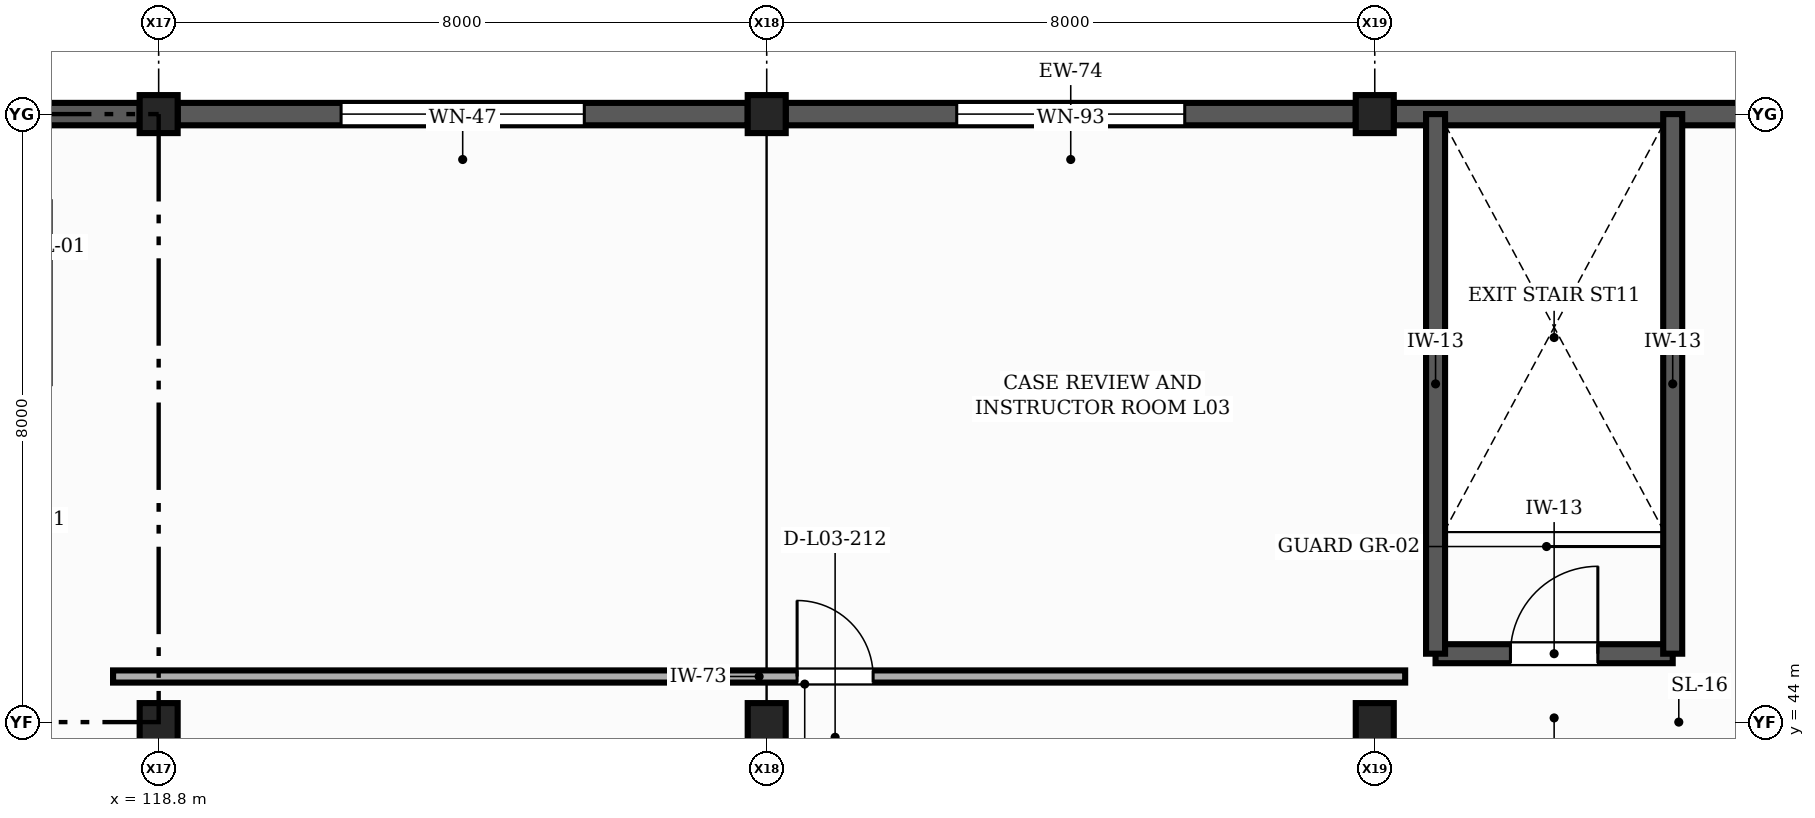
"""IFC4 building model, lengths in metres.
Left out: names, types, materials, properties, quantities, classifications, styles, units other than length and angle.
Written with IfcOpenShell. Run it as: python <this file> out.ifc"""

import sys

from ifc_helpers import new_model, si_unit, direction, frame, frame_2d, origin, origin_2d, place, context, subcontext, project, spatial, rectangle, extrude, element, fill, save


model = new_model("IFC4")
c1 = context("Model", 3, precision=1e-05, world=origin(), true_north=direction((0.0, 1.0)))
c2 = subcontext(c1, "Body", "Model", "MODEL_VIEW")
j1 = project(units=[si_unit("LENGTHUNIT", "METRE"), si_unit("PLANEANGLEUNIT", "RADIAN")], contexts=[c1])
p1 = place(None, origin())
s1 = spatial("IfcSite", under=j1, at=p1, CompositionType="ELEMENT")
p2 = place(p1, origin())
s2 = spatial("IfcBuilding", under=s1, at=p2, CompositionType="ELEMENT")
p3 = place(p2, frame((0.0, 0.0, 13.5)))
s3 = spatial("IfcBuildingStorey", under=s2, at=p3, CompositionType="ELEMENT", Elevation=13.5)
for number, where, z_axis, x_axis in (
    (1, (118.8, 44.0, 0.0), (0.0, 0.0, 1.0), (1.0, 0.0, 0.0)),
    (2, (118.8, 52.0, 0.0), (0.0, 0.0, 1.0), (1.0, 0.0, 0.0)),
    (3, (126.8, 44.0, 0.0), (0.0, 0.0, 1.0), (1.0, 0.0, 0.0)),
    (4, (126.8, 52.0, 0.0), (0.0, 0.0, 1.0), (1.0, 0.0, 0.0)),
    (5, (134.8, 44.0, 0.0), (0.0, 0.0, 1.0), (1.0, 0.0, 0.0)),
    (6, (134.8, 52.0, 0.0), (0.0, 0.0, 1.0), (1.0, 0.0, 0.0)),
):
    element("IfcColumn", number, at=place(p3, frame(where, z_axis=z_axis, x_axis=x_axis)), inside=s3, PredefinedType="COLUMN", context=c2, shape_type="SweptSolid", body=[
        extrude(rectangle(XDim=0.5, YDim=0.5, at=origin_2d()), origin(), (0.0, 0.0, 1.0), 4.5),
    ])
p4 = place(p3, frame((142.55, 52.0, 0.0), z_axis=(0.0, 0.0, 1.0), x_axis=(-1.0, 0.0, 0.0)))
e7 = element("IfcWall", 7, at=p4, inside=s3, PredefinedType="SOLIDWALL", context=c2, shape_type="SweptSolid", body=[
    extrude(rectangle(XDim=7.5, YDim=0.295, at=frame_2d((3.75, 0.0))), origin(), (0.0, 0.0, 1.0), 4.19),
])
p5 = place(p3, frame((134.55, 52.0, 0.0), z_axis=(0.0, 0.0, 1.0), x_axis=(-1.0, 0.0, 0.0)))
e8 = element("IfcWall", 8, at=p5, inside=s3, PredefinedType="SOLIDWALL", context=c2, shape_type="SweptSolid", body=[
    extrude(rectangle(XDim=7.5, YDim=0.295, at=frame_2d((3.75, 0.0))), origin(), (0.0, 0.0, 1.0), 3.54),
])
p6 = place(p5, frame((2.25, 0.0, 0.9)))
e9 = element("IfcOpeningElement", 9, at=p6, cuts=e8, PredefinedType="OPENING", context=c2, shape_type="SweptSolid", body=[
    extrude(rectangle(XDim=3.0, YDim=1.8, at=frame_2d((1.5, 0.9))), frame((0.0, 0.157, 0.0), z_axis=(0.0, -1.0, 0.0), x_axis=(1.0, 0.0, 0.0)), (0.0, 0.0, 1.0), 0.315),
])
p7 = place(p3, frame((126.55, 52.0, 0.0), z_axis=(0.0, 0.0, 1.0), x_axis=(-1.0, 0.0, 0.0)))
e10 = element("IfcWall", 10, at=p7, inside=s3, PredefinedType="SOLIDWALL", context=c2, shape_type="SweptSolid", body=[
    extrude(rectangle(XDim=7.5, YDim=0.295, at=frame_2d((3.75, 0.0))), origin(), (0.0, 0.0, 1.0), 3.54),
])
p8 = place(p7, frame((2.15, 0.0, 0.9)))
e11 = element("IfcOpeningElement", 11, at=p8, cuts=e10, PredefinedType="OPENING", context=c2, shape_type="SweptSolid", body=[
    extrude(rectangle(XDim=3.2, YDim=1.6, at=frame_2d((1.6, 0.8))), frame((0.0, 0.157, 0.0), z_axis=(0.0, -1.0, 0.0), x_axis=(1.0, 0.0, 0.0)), (0.0, 0.0, 1.0), 0.315),
])
p9 = place(p3, frame((118.55, 52.0, 0.0), z_axis=(0.0, 0.0, 1.0), x_axis=(-1.0, 0.0, 0.0)))
e12 = element("IfcWall", 12, at=p9, inside=s3, PredefinedType="SOLIDWALL", context=c2, shape_type="SweptSolid", body=[
    extrude(rectangle(XDim=7.5, YDim=0.295, at=frame_2d((3.75, 0.0))), origin(), (0.0, 0.0, 1.0), 4.19),
])
p10 = place(p3, frame((135.6, 44.9, 0.0), z_axis=(0.0, 0.0, 1.0), x_axis=(1.0, 0.0, 0.0)))
e13 = element("IfcWall", 13, at=p10, inside=s3, PredefinedType="SHEAR", context=c2, shape_type="SweptSolid", body=[
    extrude(rectangle(XDim=3.12, YDim=0.25, at=frame_2d((1.56, 0.0))), origin(), (0.0, 0.0, 1.0), 4.5),
])
p11 = place(p10, frame((0.985, 0.0, 0.0)))
e14 = element("IfcOpeningElement", 14, at=p11, cuts=e13, PredefinedType="OPENING", context=c2, shape_type="SweptSolid", body=[
    extrude(rectangle(XDim=1.15, YDim=2.15, at=frame_2d((0.575, 1.075))), frame((0.0, 0.135, 0.0), z_axis=(0.0, -1.0, 0.0), x_axis=(1.0, 0.0, 0.0)), (0.0, 0.0, 1.0), 0.27),
])
for number, where, z_axis, x_axis in (
    (15, (138.72, 44.9, 0.0), (0.0, 0.0, 1.0), (0.0, 1.0, 0.0)),
    (16, (135.6, 52.0, 0.0), (0.0, 0.0, 1.0), (0.0, -1.0, 0.0)),
):
    element("IfcWall", number, at=place(p3, frame(where, z_axis=z_axis, x_axis=x_axis)), inside=s3, PredefinedType="SHEAR", context=c2, shape_type="SweptSolid", body=[
        extrude(rectangle(XDim=7.1, YDim=0.25, at=frame_2d((3.55, 0.0))), origin(), (0.0, 0.0, 1.0), 4.5),
    ])
p12 = place(p3, frame((118.2, 44.6, 0.0), z_axis=(0.0, 0.0, 1.0), x_axis=(1.0, 0.0, 0.0)))
e17 = element("IfcWall", 17, at=p12, inside=s3, PredefinedType="PARTITIONING", context=c2, shape_type="SweptSolid", body=[
    extrude(rectangle(XDim=17.0, YDim=0.16, at=frame_2d((8.5, 0.0))), origin(), (0.0, 0.0, 1.0), 3.325),
])
p13 = place(p12, frame((9.0, 0.0, 0.0)))
e18 = element("IfcOpeningElement", 18, at=p13, cuts=e17, PredefinedType="OPENING", context=c2, shape_type="SweptSolid", body=[
    extrude(rectangle(XDim=1.0, YDim=2.1, at=frame_2d((0.5, 1.05))), frame((0.0, 0.09, 0.0), z_axis=(0.0, -1.0, 0.0), x_axis=(1.0, 0.0, 0.0)), (0.0, 0.0, 1.0), 0.18),
])
p14 = place(p6, origin())
e19 = element("IfcWindow", 19, at=p14, inside=s3, PartitioningType="SINGLE_PANEL", PredefinedType="WINDOW", context=c2, shape_type="SweptSolid", body=[
    extrude(rectangle(XDim=3.0, YDim=1.8, at=frame_2d((1.5, 0.9))), frame((0.0, 0.03, 0.0), z_axis=(0.0, -1.0, 0.0), x_axis=(1.0, 0.0, 0.0)), (0.0, 0.0, 1.0), 0.06),
])
fill(e9, e19)
p15 = place(p8, origin())
e20 = element("IfcWindow", 20, at=p15, inside=s3, PartitioningType="SINGLE_PANEL", PredefinedType="WINDOW", context=c2, shape_type="SweptSolid", body=[
    extrude(rectangle(XDim=3.2, YDim=1.6, at=frame_2d((1.6, 0.8))), frame((0.0, 0.03, 0.0), z_axis=(0.0, -1.0, 0.0), x_axis=(1.0, 0.0, 0.0)), (0.0, 0.0, 1.0), 0.06),
])
fill(e11, e20)
p16 = place(p11, origin())
e21 = element("IfcDoor", 21, at=p16, inside=s3, OperationType="SINGLE_SWING_RIGHT", PredefinedType="DOOR", context=c2, shape_type="SweptSolid", body=[
    extrude(rectangle(XDim=1.15, YDim=2.15, at=frame_2d((0.575, 1.075))), frame((0.0, 0.025, 0.0), z_axis=(0.0, -1.0, 0.0), x_axis=(1.0, 0.0, 0.0)), (0.0, 0.0, 1.0), 0.05),
])
fill(e14, e21)
p17 = place(p13, origin())
e22 = element("IfcDoor", 22, at=p17, inside=s3, OperationType="SINGLE_SWING_LEFT", PredefinedType="DOOR", context=c2, shape_type="SweptSolid", body=[
    extrude(rectangle(XDim=1.0, YDim=2.1, at=frame_2d((0.5, 1.05))), frame((0.0, 0.025, 0.0), z_axis=(0.0, -1.0, 0.0), x_axis=(1.0, 0.0, 0.0)), (0.0, 0.0, 1.0), 0.05),
])
fill(e18, e22)
save(model, sys.argv[1])
